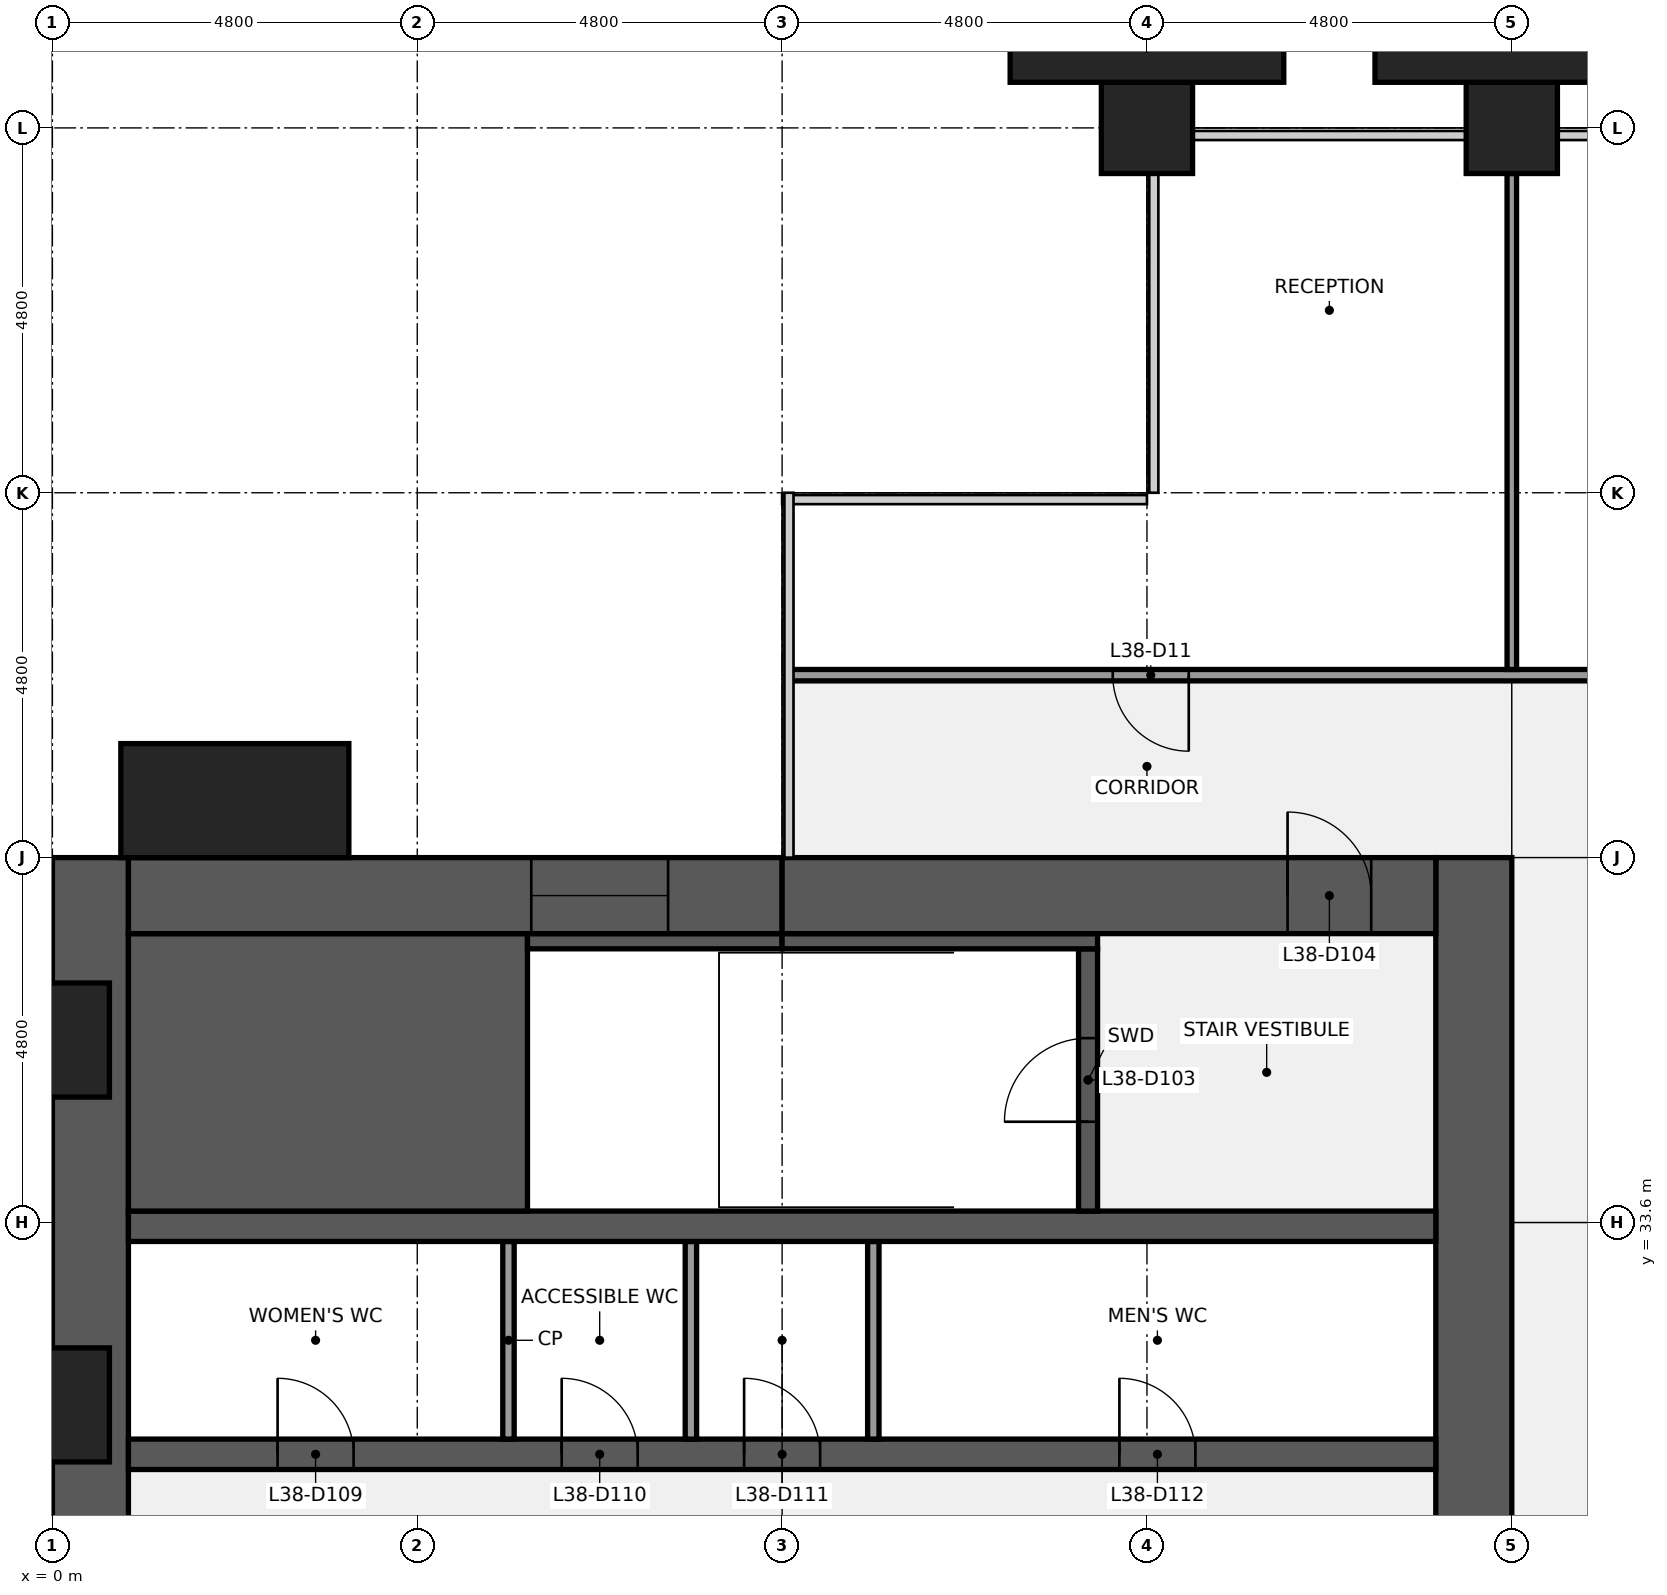
"""IFC4 building model, lengths in metres.
Left out: names, types, materials, properties, quantities, classifications, styles, units other than length and angle.
Written with IfcOpenShell. Run it as: python <this file> out.ifc"""

import sys

from ifc_helpers import new_model, si_unit, direction, frame, frame_2d, origin, origin_2d, place, context, subcontext, project, spatial, rectangle, extrude, element, fill, save


model = new_model("IFC4")
c1 = context("Model", 3, precision=1e-05, world=origin(), true_north=direction((0.0, 1.0)))
c2 = subcontext(c1, "Body", "Model", "MODEL_VIEW")
j1 = project(units=[si_unit("LENGTHUNIT", "METRE"), si_unit("PLANEANGLEUNIT", "RADIAN")], contexts=[c1])
p1 = place(None, origin())
s1 = spatial("IfcSite", under=j1, at=p1, CompositionType="ELEMENT")
p2 = place(p1, origin())
s2 = spatial("IfcBuilding", under=s1, at=p2, CompositionType="ELEMENT")
p3 = place(p2, frame((0.0, 0.0, 172.1)))
s3 = spatial("IfcBuildingStorey", under=s2, at=p3, CompositionType="ELEMENT", Elevation=172.1)
for number, where, z_axis, x_axis in (
    (1, (14.4, 48.0, 0.0), (0.0, 0.0, 1.0), (1.0, 0.0, 0.0)),
    (2, (19.2, 48.0, 0.0), (0.0, 0.0, 1.0), (1.0, 0.0, 0.0)),
):
    element("IfcColumn", number, at=place(p3, frame(where, z_axis=z_axis, x_axis=x_axis)), inside=s3, PredefinedType="COLUMN", context=c2, shape_type="SweptSolid", body=[
        extrude(rectangle(XDim=1.2, YDim=1.2, at=origin_2d()), origin(), (0.0, 0.0, 1.0), 4.0),
    ])
p4 = place(p3, frame((0.5, 9.6, 0.0), z_axis=(0.0, 0.0, 1.0), x_axis=(0.0, 1.0, 0.0)))
e3 = element("IfcWall", 3, at=p4, inside=s3, PredefinedType="SHEAR", context=c2, shape_type="SweptSolid", body=[
    extrude(rectangle(XDim=28.8, YDim=1.0, at=frame_2d((14.4, 0.0))), origin(), (0.0, 0.0, 1.0), 3.7),
])
p5 = place(p4, frame((8.85, 0.0, 0.9)))
e4 = element("IfcOpeningElement", 4, at=p5, cuts=e3, PredefinedType="OPENING", context=c2, shape_type="SweptSolid", body=[
    extrude(rectangle(XDim=1.5, YDim=1.5, at=frame_2d((0.75, 0.75))), frame((0.0, 0.51, 0.0), z_axis=(0.0, -1.0, 0.0), x_axis=(1.0, 0.0, 0.0)), (0.0, 0.0, 1.0), 1.02),
])
p6 = place(p4, frame((18.45, 0.0, 0.9)))
e5 = element("IfcOpeningElement", 5, at=p6, cuts=e3, PredefinedType="OPENING", context=c2, shape_type="SweptSolid", body=[
    extrude(rectangle(XDim=1.5, YDim=1.5, at=frame_2d((0.75, 0.75))), frame((0.0, 0.51, 0.0), z_axis=(0.0, -1.0, 0.0), x_axis=(1.0, 0.0, 0.0)), (0.0, 0.0, 1.0), 1.02),
])
p7 = place(p3, frame((18.7, 38.4, 0.0), z_axis=(0.0, 0.0, 1.0), x_axis=(0.0, -1.0, 0.0)))
e6 = element("IfcWall", 6, at=p7, inside=s3, PredefinedType="SHEAR", context=c2, shape_type="SweptSolid", body=[
    extrude(rectangle(XDim=28.8, YDim=1.0, at=frame_2d((14.4, 0.0))), origin(), (0.0, 0.0, 1.0), 3.7),
])
p8 = place(p7, frame((18.3, 0.0, 0.0)))
e7 = element("IfcOpeningElement", 7, at=p8, cuts=e6, PredefinedType="OPENING", context=c2, shape_type="SweptSolid", body=[
    extrude(rectangle(XDim=1.8, YDim=2.1, at=frame_2d((0.9, 1.05))), frame((0.0, 0.51, 0.0), z_axis=(0.0, -1.0, 0.0), x_axis=(1.0, 0.0, 0.0)), (0.0, 0.0, 1.0), 1.02),
])
p9 = place(p7, frame((8.7, 0.0, 0.0)))
e8 = element("IfcOpeningElement", 8, at=p9, cuts=e6, PredefinedType="OPENING", context=c2, shape_type="SweptSolid", body=[
    extrude(rectangle(XDim=1.8, YDim=2.1, at=frame_2d((0.9, 1.05))), frame((0.0, 0.51, 0.0), z_axis=(0.0, -1.0, 0.0), x_axis=(1.0, 0.0, 0.0)), (0.0, 0.0, 1.0), 1.02),
])
p10 = place(p3, frame((1.0, 30.55, 0.0), z_axis=(0.0, 0.0, 1.0), x_axis=(1.0, 0.0, 0.0)))
e9 = element("IfcWall", 9, at=p10, inside=s3, PredefinedType="SHEAR", context=c2, shape_type="SweptSolid", body=[
    extrude(rectangle(XDim=17.2, YDim=0.4, at=frame_2d((8.6, 0.0))), origin(), (0.0, 0.0, 1.0), 3.7),
])
p11 = place(p10, frame((1.962, 0.0, 0.0)))
e10 = element("IfcOpeningElement", 10, at=p11, cuts=e9, PredefinedType="OPENING", context=c2, shape_type="SweptSolid", body=[
    extrude(rectangle(XDim=1.0, YDim=2.1, at=frame_2d((0.5, 1.05))), frame((0.0, 0.21, 0.0), z_axis=(0.0, -1.0, 0.0), x_axis=(1.0, 0.0, 0.0)), (0.0, 0.0, 1.0), 0.42),
])
p12 = place(p10, frame((5.7, 0.0, 0.0)))
e11 = element("IfcOpeningElement", 11, at=p12, cuts=e9, PredefinedType="OPENING", context=c2, shape_type="SweptSolid", body=[
    extrude(rectangle(XDim=1.0, YDim=2.1, at=frame_2d((0.5, 1.05))), frame((0.0, 0.21, 0.0), z_axis=(0.0, -1.0, 0.0), x_axis=(1.0, 0.0, 0.0)), (0.0, 0.0, 1.0), 0.42),
])
p13 = place(p10, frame((8.1, 0.0, 0.0)))
e12 = element("IfcOpeningElement", 12, at=p13, cuts=e9, PredefinedType="OPENING", context=c2, shape_type="SweptSolid", body=[
    extrude(rectangle(XDim=1.0, YDim=2.1, at=frame_2d((0.5, 1.05))), frame((0.0, 0.21, 0.0), z_axis=(0.0, -1.0, 0.0), x_axis=(1.0, 0.0, 0.0)), (0.0, 0.0, 1.0), 0.42),
])
p14 = place(p10, frame((13.038, 0.0, 0.0)))
e13 = element("IfcOpeningElement", 13, at=p14, cuts=e9, PredefinedType="OPENING", context=c2, shape_type="SweptSolid", body=[
    extrude(rectangle(XDim=1.0, YDim=2.1, at=frame_2d((0.5, 1.05))), frame((0.0, 0.21, 0.0), z_axis=(0.0, -1.0, 0.0), x_axis=(1.0, 0.0, 0.0)), (0.0, 0.0, 1.0), 0.42),
])
for number, where, z_axis, x_axis in (
    (14, (6.0, 30.75, 0.0), (0.0, 0.0, 1.0), (0.0, 1.0, 0.0)),
    (15, (8.4, 30.75, 0.0), (0.0, 0.0, 1.0), (0.0, 1.0, 0.0)),
    (16, (10.8, 30.75, 0.0), (0.0, 0.0, 1.0), (0.0, 1.0, 0.0)),
):
    element("IfcWall", number, at=place(p3, frame(where, z_axis=z_axis, x_axis=x_axis)), inside=s3, PredefinedType="PARTITIONING", context=c2, shape_type="SweptSolid", body=[
        extrude(rectangle(XDim=2.6, YDim=0.15, at=frame_2d((1.3, 0.0))), origin(), (0.0, 0.0, 1.0), 3.7),
    ])
p15 = place(p3, frame((1.0, 33.55, 0.0), z_axis=(0.0, 0.0, 1.0), x_axis=(1.0, 0.0, 0.0)))
e17 = element("IfcWall", 17, at=p15, inside=s3, PredefinedType="SHEAR", context=c2, shape_type="SweptSolid", body=[
    extrude(rectangle(XDim=17.2, YDim=0.4, at=frame_2d((8.6, 0.0))), origin(), (0.0, 0.0, 1.0), 3.7),
])
p16 = place(p3, frame((1.0, 35.575, 0.0), z_axis=(0.0, 0.0, 1.0), x_axis=(1.0, 0.0, 0.0)))
e18 = element("IfcWall", 18, at=p16, inside=s3, PredefinedType="SHEAR", context=c2, shape_type="SweptSolid", body=[
    extrude(rectangle(XDim=5.25, YDim=3.65, at=frame_2d((2.625, 0.0))), origin(), (0.0, 0.0, 1.0), 3.7),
])
p17 = place(p3, frame((13.625, 33.75, 0.0), z_axis=(0.0, 0.0, 1.0), x_axis=(0.0, 1.0, 0.0)))
e19 = element("IfcWall", 19, at=p17, inside=s3, PredefinedType="SHEAR", context=c2, shape_type="SweptSolid", body=[
    extrude(rectangle(XDim=3.45, YDim=0.25, at=frame_2d((1.725, 0.0))), origin(), (0.0, 0.0, 1.0), 3.7),
])
p18 = place(p17, frame((1.175, 0.0, 0.0)))
e20 = element("IfcOpeningElement", 20, at=p18, cuts=e19, PredefinedType="OPENING", context=c2, shape_type="SweptSolid", body=[
    extrude(rectangle(XDim=1.1, YDim=2.1, at=frame_2d((0.55, 1.05))), frame((0.0, 0.135, 0.0), z_axis=(0.0, -1.0, 0.0), x_axis=(1.0, 0.0, 0.0)), (0.0, 0.0, 1.0), 0.27),
])
p19 = place(p3, frame((6.25, 37.3, 0.0), z_axis=(0.0, 0.0, 1.0), x_axis=(1.0, 0.0, 0.0)))
e21 = element("IfcWall", 21, at=p19, inside=s3, PredefinedType="SHEAR", context=c2, shape_type="SweptSolid", body=[
    extrude(rectangle(XDim=3.35, YDim=0.2, at=frame_2d((1.675, 0.0))), origin(), (0.0, 0.0, 1.0), 3.7),
])
p20 = place(p3, frame((9.6, 37.3, 0.0), z_axis=(0.0, 0.0, 1.0), x_axis=(1.0, 0.0, 0.0)))
e22 = element("IfcWall", 22, at=p20, inside=s3, PredefinedType="SHEAR", context=c2, shape_type="SweptSolid", body=[
    extrude(rectangle(XDim=4.15, YDim=0.2, at=frame_2d((2.075, 0.0))), origin(), (0.0, 0.0, 1.0), 3.7),
])
p21 = place(p3, frame((1.0, 37.9, 0.0), z_axis=(0.0, 0.0, 1.0), x_axis=(1.0, 0.0, 0.0)))
e23 = element("IfcWall", 23, at=p21, inside=s3, PredefinedType="SHEAR", context=c2, shape_type="SweptSolid", body=[
    extrude(rectangle(XDim=8.6, YDim=1.0, at=frame_2d((4.3, 0.0))), origin(), (0.0, 0.0, 1.0), 3.7),
])
p22 = place(p21, frame((5.3, 0.0, 0.9)))
e24 = element("IfcOpeningElement", 24, at=p22, cuts=e23, PredefinedType="OPENING", context=c2, shape_type="SweptSolid", body=[
    extrude(rectangle(XDim=1.8, YDim=1.5, at=frame_2d((0.9, 0.75))), frame((0.0, 0.51, 0.0), z_axis=(0.0, -1.0, 0.0), x_axis=(1.0, 0.0, 0.0)), (0.0, 0.0, 1.0), 1.02),
])
p23 = place(p3, frame((9.6, 37.9, 0.0), z_axis=(0.0, 0.0, 1.0), x_axis=(1.0, 0.0, 0.0)))
e25 = element("IfcWall", 25, at=p23, inside=s3, PredefinedType="SHEAR", context=c2, shape_type="SweptSolid", body=[
    extrude(rectangle(XDim=8.6, YDim=1.0, at=frame_2d((4.3, 0.0))), origin(), (0.0, 0.0, 1.0), 3.7),
])
p24 = place(p23, frame((6.65, 0.0, 0.0)))
e26 = element("IfcOpeningElement", 26, at=p24, cuts=e25, PredefinedType="OPENING", context=c2, shape_type="SweptSolid", body=[
    extrude(rectangle(XDim=1.1, YDim=2.1, at=frame_2d((0.55, 1.05))), frame((0.0, 0.51, 0.0), z_axis=(0.0, -1.0, 0.0), x_axis=(1.0, 0.0, 0.0)), (0.0, 0.0, 1.0), 1.02),
])
p25 = place(p3, frame((9.7, 40.8, 0.0), z_axis=(0.0, 0.0, 1.0), x_axis=(1.0, 0.0, 0.0)))
e27 = element("IfcWall", 27, at=p25, inside=s3, PredefinedType="PARTITIONING", context=c2, shape_type="SweptSolid", body=[
    extrude(rectangle(XDim=38.2, YDim=0.15, at=frame_2d((19.1, 0.0))), origin(), (0.0, 0.0, 1.0), 2.709),
])
p26 = place(p25, frame((4.25, 0.0, 0.0)))
e28 = element("IfcOpeningElement", 28, at=p26, cuts=e27, PredefinedType="OPENING", context=c2, shape_type="SweptSolid", body=[
    extrude(rectangle(XDim=1.0, YDim=2.1, at=frame_2d((0.5, 1.05))), frame((0.0, 0.085, 0.0), z_axis=(0.0, -1.0, 0.0), x_axis=(1.0, 0.0, 0.0)), (0.0, 0.0, 1.0), 0.17),
])
p27 = place(p25, frame((15.0, 0.0, 0.0)))
e29 = element("IfcOpeningElement", 29, at=p27, cuts=e27, PredefinedType="OPENING", context=c2, shape_type="SweptSolid", body=[
    extrude(rectangle(XDim=1.0, YDim=2.1, at=frame_2d((0.5, 1.05))), frame((0.0, 0.085, 0.0), z_axis=(0.0, -1.0, 0.0), x_axis=(1.0, 0.0, 0.0)), (0.0, 0.0, 1.0), 0.17),
])
p28 = place(p25, frame((24.6, 0.0, 0.0)))
e30 = element("IfcOpeningElement", 30, at=p28, cuts=e27, PredefinedType="OPENING", context=c2, shape_type="SweptSolid", body=[
    extrude(rectangle(XDim=1.0, YDim=2.1, at=frame_2d((0.5, 1.05))), frame((0.0, 0.085, 0.0), z_axis=(0.0, -1.0, 0.0), x_axis=(1.0, 0.0, 0.0)), (0.0, 0.0, 1.0), 0.17),
])
p29 = place(p25, frame((32.95, 0.0, 0.0)))
e31 = element("IfcOpeningElement", 31, at=p29, cuts=e27, PredefinedType="OPENING", context=c2, shape_type="SweptSolid", body=[
    extrude(rectangle(XDim=1.0, YDim=2.1, at=frame_2d((0.5, 1.05))), frame((0.0, 0.085, 0.0), z_axis=(0.0, -1.0, 0.0), x_axis=(1.0, 0.0, 0.0)), (0.0, 0.0, 1.0), 0.17),
])
p30 = place(p3, frame((19.2, 40.875, 0.0), z_axis=(0.0, 0.0, 1.0), x_axis=(0.0, 1.0, 0.0)))
e32 = element("IfcWall", 32, at=p30, inside=s3, PredefinedType="PARTITIONING", context=c2, shape_type="SweptSolid", body=[
    extrude(rectangle(XDim=6.525, YDim=0.125, at=frame_2d((3.262, 0.0))), origin(), (0.0, 0.0, 1.0), 2.709),
])
p31 = place(p3, frame((2.4, 39.15, 0.0), z_axis=(0.0, 0.0, 1.0), x_axis=(1.0, 0.0, 0.0)))
e33 = element("IfcColumn", 33, at=p31, inside=s3, PredefinedType="PILASTER", context=c2, shape_type="SweptSolid", body=[
    extrude(rectangle(XDim=3.0, YDim=1.5, at=origin_2d()), origin(), (0.0, 0.0, 1.0), 4.0),
])
for number, where, z_axis, x_axis in (
    (34, (14.4, 49.05, 0.0), (0.0, 0.0, 1.0), (1.0, 0.0, 0.0)),
    (35, (19.2, 49.05, 0.0), (0.0, 0.0, 1.0), (1.0, 0.0, 0.0)),
):
    element("IfcColumn", number, at=place(p3, frame(where, z_axis=z_axis, x_axis=x_axis)), inside=s3, PredefinedType="PILASTER", context=c2, shape_type="SweptSolid", body=[
        extrude(rectangle(XDim=3.6, YDim=0.9, at=origin_2d()), origin(), (0.0, 0.0, 1.0), 4.0),
    ])
p32 = place(p18, origin())
e36 = element("IfcDoor", 36, at=p32, inside=s3, OperationType="SINGLE_SWING_LEFT", PredefinedType="DOOR", context=c2, shape_type="SweptSolid", body=[
    extrude(rectangle(XDim=1.1, YDim=2.1, at=frame_2d((0.55, 1.05))), frame((0.0, 0.025, 0.0), z_axis=(0.0, -1.0, 0.0), x_axis=(1.0, 0.0, 0.0)), (0.0, 0.0, 1.0), 0.05),
])
fill(e20, e36)
p33 = place(p24, origin())
e37 = element("IfcDoor", 37, at=p33, inside=s3, OperationType="SINGLE_SWING_LEFT", PredefinedType="DOOR", context=c2, shape_type="SweptSolid", body=[
    extrude(rectangle(XDim=1.1, YDim=2.1, at=frame_2d((0.55, 1.05))), frame((0.0, 0.025, 0.0), z_axis=(0.0, -1.0, 0.0), x_axis=(1.0, 0.0, 0.0)), (0.0, 0.0, 1.0), 0.05),
])
fill(e26, e37)
p34 = place(p11, origin())
e38 = element("IfcDoor", 38, at=p34, inside=s3, OperationType="SINGLE_SWING_LEFT", PredefinedType="DOOR", context=c2, shape_type="SweptSolid", body=[
    extrude(rectangle(XDim=1.0, YDim=2.1, at=frame_2d((0.5, 1.05))), frame((0.0, 0.025, 0.0), z_axis=(0.0, -1.0, 0.0), x_axis=(1.0, 0.0, 0.0)), (0.0, 0.0, 1.0), 0.05),
])
fill(e10, e38)
p35 = place(p12, origin())
e39 = element("IfcDoor", 39, at=p35, inside=s3, OperationType="SINGLE_SWING_LEFT", PredefinedType="DOOR", context=c2, shape_type="SweptSolid", body=[
    extrude(rectangle(XDim=1.0, YDim=2.1, at=frame_2d((0.5, 1.05))), frame((0.0, 0.025, 0.0), z_axis=(0.0, -1.0, 0.0), x_axis=(1.0, 0.0, 0.0)), (0.0, 0.0, 1.0), 0.05),
])
fill(e11, e39)
p36 = place(p13, origin())
e40 = element("IfcDoor", 40, at=p36, inside=s3, OperationType="SINGLE_SWING_LEFT", PredefinedType="DOOR", context=c2, shape_type="SweptSolid", body=[
    extrude(rectangle(XDim=1.0, YDim=2.1, at=frame_2d((0.5, 1.05))), frame((0.0, 0.025, 0.0), z_axis=(0.0, -1.0, 0.0), x_axis=(1.0, 0.0, 0.0)), (0.0, 0.0, 1.0), 0.05),
])
fill(e12, e40)
p37 = place(p14, origin())
e41 = element("IfcDoor", 41, at=p37, inside=s3, OperationType="SINGLE_SWING_LEFT", PredefinedType="DOOR", context=c2, shape_type="SweptSolid", body=[
    extrude(rectangle(XDim=1.0, YDim=2.1, at=frame_2d((0.5, 1.05))), frame((0.0, 0.025, 0.0), z_axis=(0.0, -1.0, 0.0), x_axis=(1.0, 0.0, 0.0)), (0.0, 0.0, 1.0), 0.05),
])
fill(e13, e41)
p38 = place(p22, origin())
e42 = element("IfcWindow", 42, at=p38, inside=s3, PartitioningType="SINGLE_PANEL", PredefinedType="WINDOW", context=c2, shape_type="SweptSolid", body=[
    extrude(rectangle(XDim=1.8, YDim=1.5, at=frame_2d((0.9, 0.75))), frame((0.0, 0.03, 0.0), z_axis=(0.0, -1.0, 0.0), x_axis=(1.0, 0.0, 0.0)), (0.0, 0.0, 1.0), 0.06),
])
fill(e24, e42)
p39 = place(p26, origin())
e43 = element("IfcDoor", 43, at=p39, inside=s3, OperationType="SINGLE_SWING_RIGHT", PredefinedType="DOOR", context=c2, shape_type="SweptSolid", body=[
    extrude(rectangle(XDim=1.0, YDim=2.1, at=frame_2d((0.5, 1.05))), frame((0.0, 0.025, 0.0), z_axis=(0.0, -1.0, 0.0), x_axis=(1.0, 0.0, 0.0)), (0.0, 0.0, 1.0), 0.05),
])
fill(e28, e43)
save(model, sys.argv[1])
